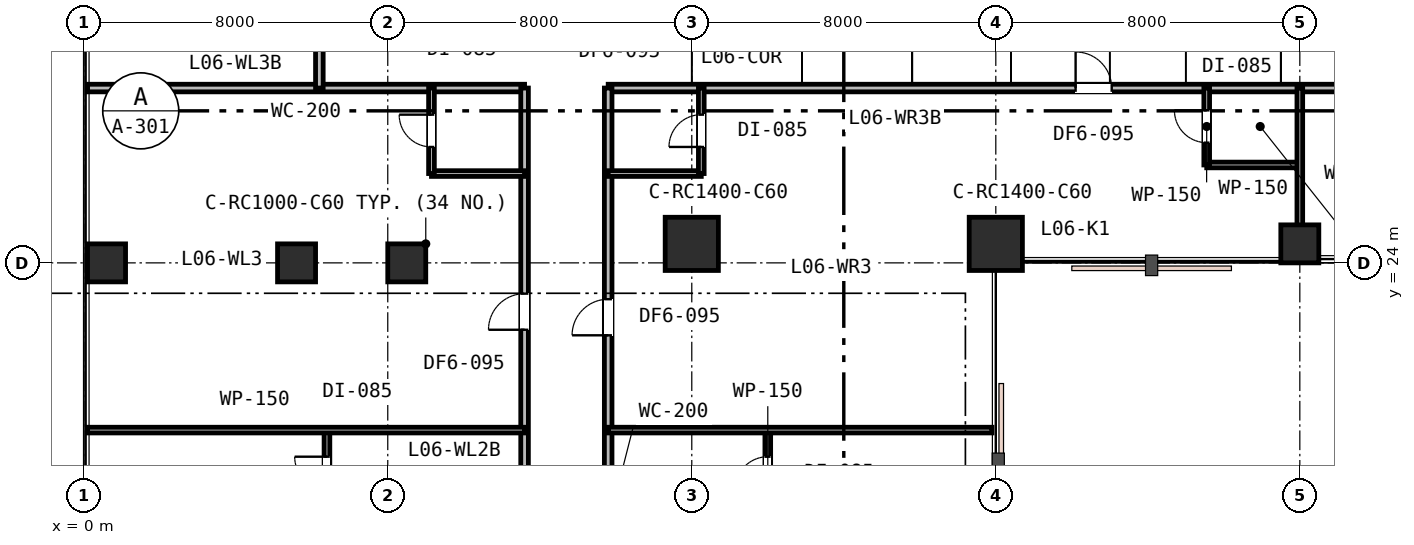
"""IFC4 building model, lengths in metres.
Left out: names, types, materials, properties, quantities, classifications, styles, units other than length and angle.
Written with IfcOpenShell. Run it as: python <this file> out.ifc"""

import sys

from ifc_helpers import new_model, si_unit, direction, frame, frame_2d, origin, origin_2d, place, context, subcontext, project, spatial, rectangle, extrude, element, fill, save


model = new_model("IFC4")
c1 = context("Model", 3, precision=1e-05, world=origin(), true_north=direction((0.0, 1.0)))
c2 = subcontext(c1, "Body", "Model", "MODEL_VIEW")
j1 = project(units=[si_unit("LENGTHUNIT", "METRE"), si_unit("PLANEANGLEUNIT", "RADIAN")], contexts=[c1])
p1 = place(None, origin())
s1 = spatial("IfcSite", under=j1, at=p1, CompositionType="ELEMENT")
p2 = place(p1, origin())
s2 = spatial("IfcBuilding", under=s1, at=p2, CompositionType="ELEMENT")
p3 = place(p2, frame((0.0, 0.0, 29.4)))
s3 = spatial("IfcBuildingStorey", under=s2, at=p3, CompositionType="ELEMENT", Elevation=29.4)
p4 = place(p3, frame((8.5, 24.0, 0.0), z_axis=(0.0, 0.0, 1.0), x_axis=(1.0, 0.0, 0.0)))
e1 = element("IfcColumn", 1, at=p4, inside=s3, PredefinedType="COLUMN", context=c2, shape_type="SweptSolid", body=[
    extrude(rectangle(XDim=1.0, YDim=1.0, at=origin_2d()), origin(), (0.0, 0.0, 1.0), 3.6),
])
for number, where, z_axis, x_axis in (
    (2, (16.0, 24.5, 0.0), (0.0, 0.0, 1.0), (1.0, 0.0, 0.0)),
    (3, (24.0, 24.5, 0.0), (0.0, 0.0, 1.0), (1.0, 0.0, 0.0)),
):
    element("IfcColumn", number, at=place(p3, frame(where, z_axis=z_axis, x_axis=x_axis)), inside=s3, PredefinedType="COLUMN", context=c2, shape_type="SweptSolid", body=[
        extrude(rectangle(XDim=1.4, YDim=1.4, at=origin_2d()), origin(), (0.0, 0.0, 1.0), 3.6),
    ])
for number, where, z_axis, x_axis in (
    (4, (32.0, 24.5, 0.0), (0.0, 0.0, 1.0), (1.0, 0.0, 0.0)),
    (5, (5.6, 24.0, 0.0), (0.0, 0.0, 1.0), (1.0, 0.0, 0.0)),
    (6, (0.6, 24.0, 0.0), (0.0, 0.0, 1.0), (1.0, 0.0, 0.0)),
):
    element("IfcColumn", number, at=place(p3, frame(where, z_axis=z_axis, x_axis=x_axis)), inside=s3, PredefinedType="COLUMN", context=c2, shape_type="SweptSolid", body=[
        extrude(rectangle(XDim=1.0, YDim=1.0, at=origin_2d()), origin(), (0.0, 0.0, 1.0), 3.6),
    ])
p5 = place(p3, frame((0.1, 28.6, 0.0), z_axis=(0.0, 0.0, 1.0), x_axis=(1.0, 0.0, 0.0)))
e7 = element("IfcWall", 7, at=p5, inside=s3, PredefinedType="PARTITIONING", context=c2, shape_type="SweptSolid", body=[
    extrude(rectangle(XDim=11.5, YDim=0.2, at=frame_2d((5.75, 0.0))), origin(), (0.0, 0.0, 1.0), 2.68),
])
p6 = place(p3, frame((13.8, 28.6, 0.0), z_axis=(0.0, 0.0, 1.0), x_axis=(1.0, 0.0, 0.0)))
e8 = element("IfcWall", 8, at=p6, inside=s3, PredefinedType="PARTITIONING", context=c2, shape_type="SweptSolid", body=[
    extrude(rectangle(XDim=36.6, YDim=0.2, at=frame_2d((18.3, 0.0))), origin(), (0.0, 0.0, 1.0), 2.68),
])
p7 = place(p6, frame((12.3, 0.0, 0.0)))
e9 = element("IfcOpeningElement", 9, at=p7, cuts=e8, PredefinedType="OPENING", context=c2, shape_type="SweptSolid", body=[
    extrude(rectangle(XDim=0.95, YDim=2.15, at=frame_2d((0.475, 1.075))), frame((0.0, 0.11, 0.0), z_axis=(0.0, -1.0, 0.0), x_axis=(1.0, 0.0, 0.0)), (0.0, 0.0, 1.0), 0.22),
])
p8 = place(p6, frame((20.075, 0.0, 0.0)))
e10 = element("IfcOpeningElement", 10, at=p8, cuts=e8, PredefinedType="OPENING", context=c2, shape_type="SweptSolid", body=[
    extrude(rectangle(XDim=0.95, YDim=2.15, at=frame_2d((0.475, 1.075))), frame((0.0, 0.11, 0.0), z_axis=(0.0, -1.0, 0.0), x_axis=(1.0, 0.0, 0.0)), (0.0, 0.0, 1.0), 0.22),
])
p9 = place(p6, frame((26.829, 0.0, 0.0)))
e11 = element("IfcOpeningElement", 11, at=p9, cuts=e8, PredefinedType="OPENING", context=c2, shape_type="SweptSolid", body=[
    extrude(rectangle(XDim=0.95, YDim=2.15, at=frame_2d((0.475, 1.075))), frame((0.0, 0.11, 0.0), z_axis=(0.0, -1.0, 0.0), x_axis=(1.0, 0.0, 0.0)), (0.0, 0.0, 1.0), 0.22),
])
p10 = place(p6, frame((32.669, 0.0, 0.0)))
e12 = element("IfcOpeningElement", 12, at=p10, cuts=e8, PredefinedType="OPENING", context=c2, shape_type="SweptSolid", body=[
    extrude(rectangle(XDim=0.95, YDim=2.15, at=frame_2d((0.475, 1.075))), frame((0.0, 0.11, 0.0), z_axis=(0.0, -1.0, 0.0), x_axis=(1.0, 0.0, 0.0)), (0.0, 0.0, 1.0), 0.22),
])
p11 = place(p3, frame((6.2, 28.6, 0.0), z_axis=(0.0, 0.0, 1.0), x_axis=(0.0, 1.0, 0.0)))
e13 = element("IfcWall", 13, at=p11, inside=s3, PredefinedType="PARTITIONING", context=c2, shape_type="SweptSolid", body=[
    extrude(rectangle(XDim=12.4, YDim=0.2, at=frame_2d((6.2, 0.0))), origin(), (0.0, 0.0, 1.0), 2.68),
])
p12 = place(p11, frame((3.725, 0.0, 0.0)))
e14 = element("IfcOpeningElement", 14, at=p12, cuts=e13, PredefinedType="OPENING", context=c2, shape_type="SweptSolid", body=[
    extrude(rectangle(XDim=0.95, YDim=2.15, at=frame_2d((0.475, 1.075))), frame((0.0, 0.11, 0.0), z_axis=(0.0, -1.0, 0.0), x_axis=(1.0, 0.0, 0.0)), (0.0, 0.0, 1.0), 0.22),
])
p13 = place(p11, frame((8.91, 0.0, 0.0)))
e15 = element("IfcOpeningElement", 15, at=p13, cuts=e13, PredefinedType="OPENING", context=c2, shape_type="SweptSolid", body=[
    extrude(rectangle(XDim=0.95, YDim=2.15, at=frame_2d((0.475, 1.075))), frame((0.0, 0.11, 0.0), z_axis=(0.0, -1.0, 0.0), x_axis=(1.0, 0.0, 0.0)), (0.0, 0.0, 1.0), 0.22),
])
p14 = place(p3, frame((29.55, 26.576, 0.0), z_axis=(0.0, 0.0, 1.0), x_axis=(1.0, 0.0, 0.0)))
e16 = element("IfcWall", 16, at=p14, inside=s3, PredefinedType="PARTITIONING", context=c2, shape_type="SweptSolid", body=[
    extrude(rectangle(XDim=2.45, YDim=0.15, at=frame_2d((1.225, 0.0))), origin(), (0.0, 0.0, 1.0), 3.33),
])
p15 = place(p3, frame((29.55, 26.576, 0.0), z_axis=(0.0, 0.0, 1.0), x_axis=(0.0, 1.0, 0.0)))
e17 = element("IfcWall", 17, at=p15, inside=s3, PredefinedType="PARTITIONING", context=c2, shape_type="SweptSolid", body=[
    extrude(rectangle(XDim=2.024, YDim=0.15, at=frame_2d((1.012, 0.0))), origin(), (0.0, 0.0, 1.0), 3.33),
])
p16 = place(p15, frame((0.587, 0.0, 0.0)))
e18 = element("IfcOpeningElement", 18, at=p16, cuts=e17, PredefinedType="OPENING", context=c2, shape_type="SweptSolid", body=[
    extrude(rectangle(XDim=0.85, YDim=2.15, at=frame_2d((0.425, 1.075))), frame((0.0, 0.085, 0.0), z_axis=(0.0, -1.0, 0.0), x_axis=(1.0, 0.0, 0.0)), (0.0, 0.0, 1.0), 0.17),
])
p17 = place(p3, frame((32.0, 28.6, 0.0), z_axis=(0.0, 0.0, 1.0), x_axis=(0.0, -1.0, 0.0)))
e19 = element("IfcWall", 19, at=p17, inside=s3, PredefinedType="PARTITIONING", context=c2, shape_type="SweptSolid", body=[
    extrude(rectangle(XDim=4.5, YDim=0.15, at=frame_2d((2.25, 0.0))), origin(), (0.0, 0.0, 1.0), 2.87),
])
p18 = place(p3, frame((11.6, 5.6, 0.0), z_axis=(0.0, 0.0, 1.0), x_axis=(0.0, 1.0, 0.0)))
e20 = element("IfcWall", 20, at=p18, inside=s3, PredefinedType="PARTITIONING", context=c2, shape_type="SweptSolid", body=[
    extrude(rectangle(XDim=23.0, YDim=0.2, at=frame_2d((11.5, 0.0))), origin(), (0.0, 0.0, 1.0), 2.68),
])
p19 = place(p18, frame((2.19, 0.0, 0.0)))
e21 = element("IfcOpeningElement", 21, at=p19, cuts=e20, PredefinedType="OPENING", context=c2, shape_type="SweptSolid", body=[
    extrude(rectangle(XDim=0.95, YDim=2.15, at=frame_2d((0.475, 1.075))), frame((0.0, 0.11, 0.0), z_axis=(0.0, -1.0, 0.0), x_axis=(1.0, 0.0, 0.0)), (0.0, 0.0, 1.0), 0.22),
])
p20 = place(p18, frame((9.29, 0.0, 0.0)))
e22 = element("IfcOpeningElement", 22, at=p20, cuts=e20, PredefinedType="OPENING", context=c2, shape_type="SweptSolid", body=[
    extrude(rectangle(XDim=0.95, YDim=2.15, at=frame_2d((0.475, 1.075))), frame((0.0, 0.11, 0.0), z_axis=(0.0, -1.0, 0.0), x_axis=(1.0, 0.0, 0.0)), (0.0, 0.0, 1.0), 0.22),
])
p21 = place(p18, frame((16.64, 0.0, 0.0)))
e23 = element("IfcOpeningElement", 23, at=p21, cuts=e20, PredefinedType="OPENING", context=c2, shape_type="SweptSolid", body=[
    extrude(rectangle(XDim=0.95, YDim=2.15, at=frame_2d((0.475, 1.075))), frame((0.0, 0.11, 0.0), z_axis=(0.0, -1.0, 0.0), x_axis=(1.0, 0.0, 0.0)), (0.0, 0.0, 1.0), 0.22),
])
p22 = place(p3, frame((13.8, 5.6, 0.0), z_axis=(0.0, 0.0, 1.0), x_axis=(0.0, 1.0, 0.0)))
e24 = element("IfcWall", 24, at=p22, inside=s3, PredefinedType="PARTITIONING", context=c2, shape_type="SweptSolid", body=[
    extrude(rectangle(XDim=23.0, YDim=0.2, at=frame_2d((11.5, 0.0))), origin(), (0.0, 0.0, 1.0), 2.68),
])
p23 = place(p22, frame((0.752, 0.0, 0.0)))
e25 = element("IfcOpeningElement", 25, at=p23, cuts=e24, PredefinedType="OPENING", context=c2, shape_type="SweptSolid", body=[
    extrude(rectangle(XDim=0.95, YDim=2.15, at=frame_2d((0.475, 1.075))), frame((0.0, 0.11, 0.0), z_axis=(0.0, -1.0, 0.0), x_axis=(1.0, 0.0, 0.0)), (0.0, 0.0, 1.0), 0.22),
])
p24 = place(p22, frame((9.29, 0.0, 0.0)))
e26 = element("IfcOpeningElement", 26, at=p24, cuts=e24, PredefinedType="OPENING", context=c2, shape_type="SweptSolid", body=[
    extrude(rectangle(XDim=0.95, YDim=2.15, at=frame_2d((0.475, 1.075))), frame((0.0, 0.11, 0.0), z_axis=(0.0, -1.0, 0.0), x_axis=(1.0, 0.0, 0.0)), (0.0, 0.0, 1.0), 0.22),
])
p25 = place(p22, frame((16.494, 0.0, 0.0)))
e27 = element("IfcOpeningElement", 27, at=p25, cuts=e24, PredefinedType="OPENING", context=c2, shape_type="SweptSolid", body=[
    extrude(rectangle(XDim=0.95, YDim=2.15, at=frame_2d((0.475, 1.075))), frame((0.0, 0.11, 0.0), z_axis=(0.0, -1.0, 0.0), x_axis=(1.0, 0.0, 0.0)), (0.0, 0.0, 1.0), 0.22),
])
p26 = place(p3, frame((6.4, 17.35, 0.0), z_axis=(0.0, 0.0, 1.0), x_axis=(0.0, 1.0, 0.0)))
e28 = element("IfcWall", 28, at=p26, inside=s3, PredefinedType="PARTITIONING", context=c2, shape_type="SweptSolid", body=[
    extrude(rectangle(XDim=2.25, YDim=0.15, at=frame_2d((1.125, 0.0))), origin(), (0.0, 0.0, 1.0), 2.68),
])
p27 = place(p26, frame((0.7, 0.0, 0.0)))
e29 = element("IfcOpeningElement", 29, at=p27, cuts=e28, PredefinedType="OPENING", context=c2, shape_type="SweptSolid", body=[
    extrude(rectangle(XDim=0.85, YDim=2.15, at=frame_2d((0.425, 1.075))), frame((0.0, 0.085, 0.0), z_axis=(0.0, -1.0, 0.0), x_axis=(1.0, 0.0, 0.0)), (0.0, 0.0, 1.0), 0.17),
])
p28 = place(p3, frame((0.1, 19.6, 0.0), z_axis=(0.0, 0.0, 1.0), x_axis=(1.0, 0.0, 0.0)))
e30 = element("IfcWall", 30, at=p28, inside=s3, PredefinedType="PARTITIONING", context=c2, shape_type="SweptSolid", body=[
    extrude(rectangle(XDim=11.5, YDim=0.15, at=frame_2d((5.75, 0.0))), origin(), (0.0, 0.0, 1.0), 2.68),
])
p29 = place(p3, frame((18.0, 17.35, 0.0), z_axis=(0.0, 0.0, 1.0), x_axis=(0.0, 1.0, 0.0)))
e31 = element("IfcWall", 31, at=p29, inside=s3, PredefinedType="PARTITIONING", context=c2, shape_type="SweptSolid", body=[
    extrude(rectangle(XDim=2.25, YDim=0.15, at=frame_2d((1.125, 0.0))), origin(), (0.0, 0.0, 1.0), 2.68),
])
p30 = place(p29, frame((0.7, 0.0, 0.0)))
e32 = element("IfcOpeningElement", 32, at=p30, cuts=e31, PredefinedType="OPENING", context=c2, shape_type="SweptSolid", body=[
    extrude(rectangle(XDim=0.85, YDim=2.15, at=frame_2d((0.425, 1.075))), frame((0.0, 0.085, 0.0), z_axis=(0.0, -1.0, 0.0), x_axis=(1.0, 0.0, 0.0)), (0.0, 0.0, 1.0), 0.17),
])
p31 = place(p3, frame((13.8, 19.6, 0.0), z_axis=(0.0, 0.0, 1.0), x_axis=(1.0, 0.0, 0.0)))
e33 = element("IfcWall", 33, at=p31, inside=s3, PredefinedType="PARTITIONING", context=c2, shape_type="SweptSolid", body=[
    extrude(rectangle(XDim=10.1, YDim=0.15, at=frame_2d((5.05, 0.0))), origin(), (0.0, 0.0, 1.0), 2.68),
])
p32 = place(p3, frame((9.15, 26.35, 0.0), z_axis=(0.0, 0.0, 1.0), x_axis=(1.0, 0.0, 0.0)))
e34 = element("IfcWall", 34, at=p32, inside=s3, PredefinedType="PARTITIONING", context=c2, shape_type="SweptSolid", body=[
    extrude(rectangle(XDim=2.45, YDim=0.15, at=frame_2d((1.225, 0.0))), origin(), (0.0, 0.0, 1.0), 3.33),
])
p33 = place(p3, frame((9.15, 26.35, 0.0), z_axis=(0.0, 0.0, 1.0), x_axis=(0.0, 1.0, 0.0)))
e35 = element("IfcWall", 35, at=p33, inside=s3, PredefinedType="PARTITIONING", context=c2, shape_type="SweptSolid", body=[
    extrude(rectangle(XDim=2.25, YDim=0.15, at=frame_2d((1.125, 0.0))), origin(), (0.0, 0.0, 1.0), 3.33),
])
p34 = place(p33, frame((0.7, 0.0, 0.0)))
e36 = element("IfcOpeningElement", 36, at=p34, cuts=e35, PredefinedType="OPENING", context=c2, shape_type="SweptSolid", body=[
    extrude(rectangle(XDim=0.85, YDim=2.15, at=frame_2d((0.425, 1.075))), frame((0.0, 0.085, 0.0), z_axis=(0.0, -1.0, 0.0), x_axis=(1.0, 0.0, 0.0)), (0.0, 0.0, 1.0), 0.17),
])
p35 = place(p3, frame((13.8, 26.35, 0.0), z_axis=(0.0, 0.0, 1.0), x_axis=(1.0, 0.0, 0.0)))
e37 = element("IfcWall", 37, at=p35, inside=s3, PredefinedType="PARTITIONING", context=c2, shape_type="SweptSolid", body=[
    extrude(rectangle(XDim=2.45, YDim=0.15, at=frame_2d((1.225, 0.0))), origin(), (0.0, 0.0, 1.0), 2.68),
])
p36 = place(p3, frame((16.25, 26.35, 0.0), z_axis=(0.0, 0.0, 1.0), x_axis=(0.0, 1.0, 0.0)))
e38 = element("IfcWall", 38, at=p36, inside=s3, PredefinedType="PARTITIONING", context=c2, shape_type="SweptSolid", body=[
    extrude(rectangle(XDim=2.25, YDim=0.15, at=frame_2d((1.125, 0.0))), origin(), (0.0, 0.0, 1.0), 2.68),
])
p37 = place(p36, frame((0.7, 0.0, 0.0)))
e39 = element("IfcOpeningElement", 39, at=p37, cuts=e38, PredefinedType="OPENING", context=c2, shape_type="SweptSolid", body=[
    extrude(rectangle(XDim=0.85, YDim=2.15, at=frame_2d((0.425, 1.075))), frame((0.0, 0.085, 0.0), z_axis=(0.0, -1.0, 0.0), x_axis=(1.0, 0.0, 0.0)), (0.0, 0.0, 1.0), 0.17),
])
p38 = place(p7, origin())
e40 = element("IfcDoor", 40, at=p38, inside=s3, OperationType="SINGLE_SWING_LEFT", PredefinedType="DOOR", context=c2, shape_type="SweptSolid", body=[
    extrude(rectangle(XDim=0.95, YDim=2.15, at=frame_2d((0.475, 1.075))), frame((0.0, 0.025, 0.0), z_axis=(0.0, -1.0, 0.0), x_axis=(1.0, 0.0, 0.0)), (0.0, 0.0, 1.0), 0.05),
])
fill(e9, e40)
p39 = place(p16, origin())
e41 = element("IfcDoor", 41, at=p39, inside=s3, OperationType="SINGLE_SWING_RIGHT", PredefinedType="DOOR", context=c2, shape_type="SweptSolid", body=[
    extrude(rectangle(XDim=0.85, YDim=2.15, at=frame_2d((0.425, 1.075))), frame((0.0, 0.025, 0.0), z_axis=(0.0, -1.0, 0.0), x_axis=(1.0, 0.0, 0.0)), (0.0, 0.0, 1.0), 0.05),
])
fill(e18, e41)
p40 = place(p27, origin())
e42 = element("IfcDoor", 42, at=p40, inside=s3, OperationType="SINGLE_SWING_RIGHT", PredefinedType="DOOR", context=c2, shape_type="SweptSolid", body=[
    extrude(rectangle(XDim=0.85, YDim=2.15, at=frame_2d((0.425, 1.075))), frame((0.0, 0.025, 0.0), z_axis=(0.0, -1.0, 0.0), x_axis=(1.0, 0.0, 0.0)), (0.0, 0.0, 1.0), 0.05),
])
fill(e29, e42)
p41 = place(p30, origin())
e43 = element("IfcDoor", 43, at=p41, inside=s3, OperationType="SINGLE_SWING_LEFT", PredefinedType="DOOR", context=c2, shape_type="SweptSolid", body=[
    extrude(rectangle(XDim=0.85, YDim=2.15, at=frame_2d((0.425, 1.075))), frame((0.0, 0.025, 0.0), z_axis=(0.0, -1.0, 0.0), x_axis=(1.0, 0.0, 0.0)), (0.0, 0.0, 1.0), 0.05),
])
fill(e32, e43)
p42 = place(p21, origin())
e44 = element("IfcDoor", 44, at=p42, inside=s3, OperationType="SINGLE_SWING_LEFT", PredefinedType="DOOR", context=c2, shape_type="SweptSolid", body=[
    extrude(rectangle(XDim=0.95, YDim=2.15, at=frame_2d((0.475, 1.075))), frame((0.0, 0.025, 0.0), z_axis=(0.0, -1.0, 0.0), x_axis=(1.0, 0.0, 0.0)), (0.0, 0.0, 1.0), 0.05),
])
fill(e23, e44)
p43 = place(p34, origin())
e45 = element("IfcDoor", 45, at=p43, inside=s3, OperationType="SINGLE_SWING_RIGHT", PredefinedType="DOOR", context=c2, shape_type="SweptSolid", body=[
    extrude(rectangle(XDim=0.85, YDim=2.15, at=frame_2d((0.425, 1.075))), frame((0.0, 0.025, 0.0), z_axis=(0.0, -1.0, 0.0), x_axis=(1.0, 0.0, 0.0)), (0.0, 0.0, 1.0), 0.05),
])
fill(e36, e45)
p44 = place(p25, origin())
e46 = element("IfcDoor", 46, at=p44, inside=s3, OperationType="SINGLE_SWING_LEFT", PredefinedType="DOOR", context=c2, shape_type="SweptSolid", body=[
    extrude(rectangle(XDim=0.95, YDim=2.15, at=frame_2d((0.475, 1.075))), frame((0.0, 0.025, 0.0), z_axis=(0.0, -1.0, 0.0), x_axis=(1.0, 0.0, 0.0)), (0.0, 0.0, 1.0), 0.05),
])
fill(e27, e46)
p45 = place(p37, origin())
e47 = element("IfcDoor", 47, at=p45, inside=s3, OperationType="SINGLE_SWING_LEFT", PredefinedType="DOOR", context=c2, shape_type="SweptSolid", body=[
    extrude(rectangle(XDim=0.85, YDim=2.15, at=frame_2d((0.425, 1.075))), frame((0.0, 0.025, 0.0), z_axis=(0.0, -1.0, 0.0), x_axis=(1.0, 0.0, 0.0)), (0.0, 0.0, 1.0), 0.05),
])
fill(e39, e47)
save(model, sys.argv[1])
